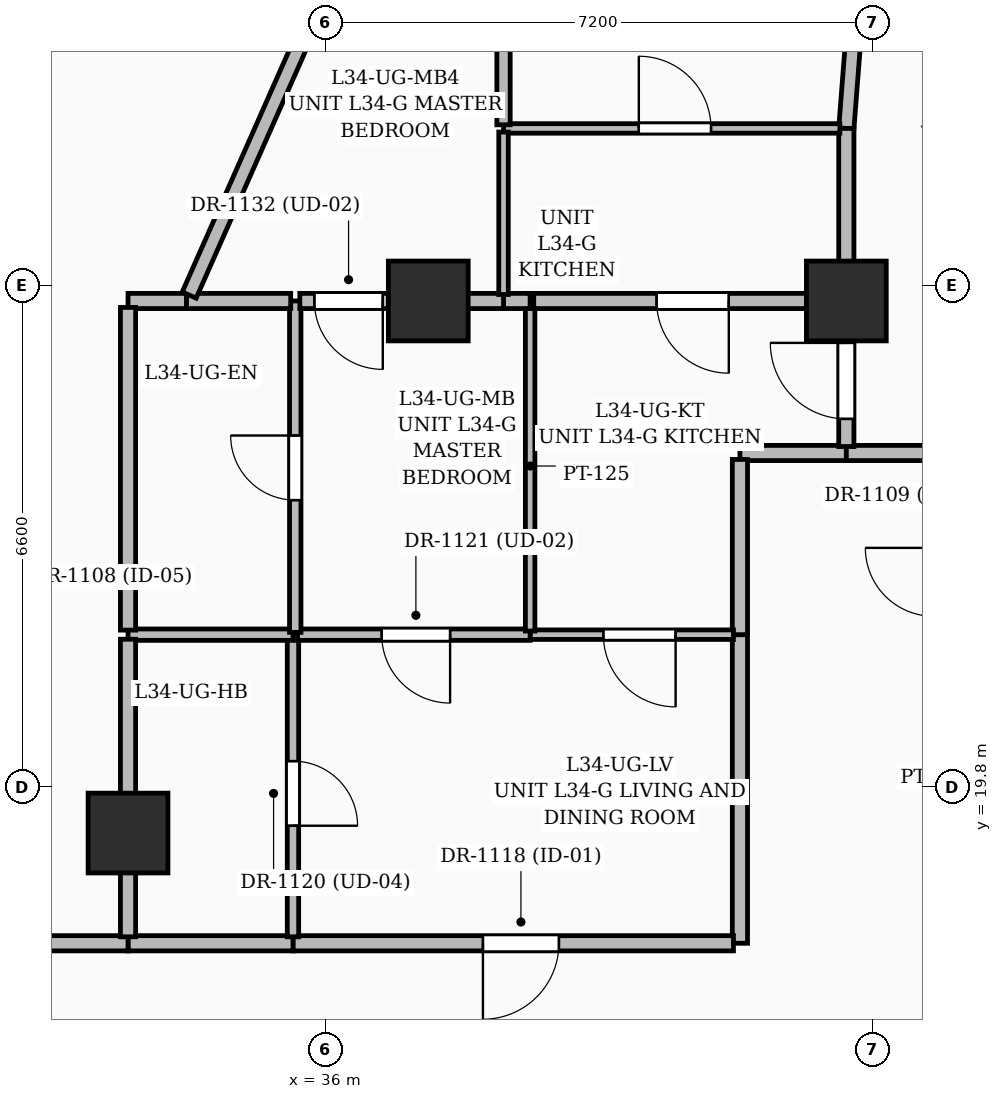
"""IFC4 building model, lengths in metres.
Left out: names, types, materials, properties, quantities, classifications, styles, units other than length and angle.
Written with IfcOpenShell. Run it as: python <this file> out.ifc"""

import sys

from ifc_helpers import new_model, si_unit, direction, frame, frame_2d, origin, origin_2d, place, context, subcontext, project, spatial, rectangle, extrude, element, fill, save


model = new_model("IFC4")
c1 = context("Model", 3, precision=1e-05, world=origin(), true_north=direction((0.0, 1.0)))
c2 = subcontext(c1, "Body", "Model", "MODEL_VIEW")
j1 = project(units=[si_unit("LENGTHUNIT", "METRE"), si_unit("PLANEANGLEUNIT", "RADIAN")], contexts=[c1])
p1 = place(None, origin())
s1 = spatial("IfcSite", under=j1, at=p1, CompositionType="ELEMENT")
p2 = place(p1, origin())
s2 = spatial("IfcBuilding", under=s1, at=p2, CompositionType="ELEMENT")
p3 = place(p2, frame((0.0, 0.0, 135.6)))
s3 = spatial("IfcBuildingStorey", under=s2, at=p3, CompositionType="ELEMENT", Elevation=135.6)
for number, where, z_axis, x_axis in (
    (1, (42.85, 26.2, 0.0), (0.0, 0.0, 1.0), (1.0, 0.0, 0.0)),
    (2, (37.35, 26.2, 0.0), (0.0, 0.0, 1.0), (1.0, 0.0, 0.0)),
    (3, (33.4, 19.2, 0.0), (0.0, 0.0, 1.0), (1.0, 0.0, 0.0)),
):
    element("IfcColumn", number, at=place(p3, frame(where, z_axis=z_axis, x_axis=x_axis)), inside=s3, PredefinedType="COLUMN", context=c2, shape_type="SweptSolid", body=[
        extrude(rectangle(XDim=1.05, YDim=1.05, at=origin_2d()), origin(), (0.0, 0.0, 1.0), 3.6),
    ])
p4 = place(p3, frame((41.45, 21.81, 0.0), z_axis=(0.0, 0.0, 1.0), x_axis=(0.0, -1.0, 0.0)))
e4 = element("IfcWall", 4, at=p4, inside=s3, PredefinedType="PARTITIONING", context=c2, shape_type="SweptSolid", body=[
    extrude(rectangle(XDim=4.06, YDim=0.2, at=frame_2d((2.03, 0.0))), origin(), (0.0, 0.0, 1.0), 3.35),
])
p5 = place(p3, frame((41.365, 17.75, 0.0), z_axis=(0.0, 0.0, 1.0), x_axis=(-1.0, 0.0, 0.0)))
e5 = element("IfcWall", 5, at=p5, inside=s3, PredefinedType="PARTITIONING", context=c2, shape_type="SweptSolid", body=[
    extrude(rectangle(XDim=5.795, YDim=0.2, at=frame_2d((2.897, 0.0))), origin(), (0.0, 0.0, 1.0), 3.35),
])
p6 = place(p5, frame((2.296, 0.0, 0.0)))
e6 = element("IfcOpeningElement", 6, at=p6, cuts=e5, PredefinedType="OPENING", context=c2, shape_type="SweptSolid", body=[
    extrude(rectangle(XDim=1.0, YDim=2.2, at=frame_2d((0.5, 1.1))), frame((0.0, 0.11, 0.0), z_axis=(0.0, -1.0, 0.0), x_axis=(1.0, 0.0, 0.0)), (0.0, 0.0, 1.0), 0.22),
])
p7 = place(p3, frame((35.57, 17.75, 0.0), z_axis=(0.0, 0.0, 1.0), x_axis=(-1.0, 0.0, 0.0)))
e7 = element("IfcWall", 7, at=p7, inside=s3, PredefinedType="PARTITIONING", context=c2, shape_type="SweptSolid", body=[
    extrude(rectangle(XDim=2.17, YDim=0.2, at=frame_2d((1.085, 0.0))), origin(), (0.0, 0.0, 1.0), 2.436),
])
p8 = place(p3, frame((42.85, 24.2, 0.0), z_axis=(0.0, 0.0, 1.0), x_axis=(-1.0, 0.0, 0.0)))
e8 = element("IfcWall", 8, at=p8, inside=s3, PredefinedType="PARTITIONING", context=c2, shape_type="SweptSolid", body=[
    extrude(rectangle(XDim=1.4, YDim=0.2, at=frame_2d((0.7, 0.0))), origin(), (0.0, 0.0, 1.0), 3.35),
])
p9 = place(p3, frame((41.45, 24.115, 0.0), z_axis=(0.0, 0.0, 1.0), x_axis=(0.0, -1.0, 0.0)))
e9 = element("IfcWall", 9, at=p9, inside=s3, PredefinedType="PARTITIONING", context=c2, shape_type="SweptSolid", body=[
    extrude(rectangle(XDim=2.305, YDim=0.2, at=frame_2d((1.152, 0.0))), origin(), (0.0, 0.0, 1.0), 3.35),
])
p10 = place(p3, frame((43.975, 24.2, 0.0), z_axis=(0.0, 0.0, 1.0), x_axis=(-1.0, 0.0, 0.0)))
e10 = element("IfcWall", 10, at=p10, inside=s3, PredefinedType="PARTITIONING", context=c2, shape_type="SweptSolid", body=[
    extrude(rectangle(XDim=1.125, YDim=0.2, at=frame_2d((0.562, 0.0))), origin(), (0.0, 0.0, 1.0), 2.436),
])
p11 = place(p3, frame((33.4, 17.75, 0.0), z_axis=(0.0, 0.0, 1.0), x_axis=(-1.0, 0.0, 0.0)))
e11 = element("IfcWall", 11, at=p11, inside=s3, PredefinedType="PARTITIONING", context=c2, shape_type="SweptSolid", body=[
    extrude(rectangle(XDim=1.45, YDim=0.2, at=frame_2d((0.725, 0.0))), origin(), (0.0, 0.0, 1.0), 3.35),
])
p12 = place(p3, frame((35.57, 21.81, 0.0), z_axis=(0.0, 0.0, 1.0), x_axis=(0.0, -1.0, 0.0)))
e12 = element("IfcWall", 12, at=p12, inside=s3, PredefinedType="PARTITIONING", context=c2, shape_type="SweptSolid", body=[
    extrude(rectangle(XDim=3.975, YDim=0.15, at=frame_2d((1.988, 0.0))), origin(), (0.0, 0.0, 1.0), 3.35),
])
p13 = place(p12, frame((1.664, 0.0, 0.0)))
e13 = element("IfcOpeningElement", 13, at=p13, cuts=e12, PredefinedType="OPENING", context=c2, shape_type="SweptSolid", body=[
    extrude(rectangle(XDim=0.85, YDim=2.1, at=frame_2d((0.425, 1.05))), frame((0.0, 0.085, 0.0), z_axis=(0.0, -1.0, 0.0), x_axis=(1.0, 0.0, 0.0)), (0.0, 0.0, 1.0), 0.17),
])
p14 = place(p3, frame((41.365, 21.81, 0.0), z_axis=(0.0, 0.0, 1.0), x_axis=(-1.0, 0.0, 0.0)))
e14 = element("IfcWall", 14, at=p14, inside=s3, PredefinedType="PARTITIONING", context=c2, shape_type="SweptSolid", body=[
    extrude(rectangle(XDim=2.675, YDim=0.125, at=frame_2d((1.337, 0.0))), origin(), (0.0, 0.0, 1.0), 3.35),
])
p15 = place(p14, frame((0.761, 0.0, 0.0)))
e15 = element("IfcOpeningElement", 15, at=p15, cuts=e14, PredefinedType="OPENING", context=c2, shape_type="SweptSolid", body=[
    extrude(rectangle(XDim=0.95, YDim=2.2, at=frame_2d((0.475, 1.1))), frame((0.0, 0.072, 0.0), z_axis=(0.0, -1.0, 0.0), x_axis=(1.0, 0.0, 0.0)), (0.0, 0.0, 1.0), 0.145),
])
p16 = place(p3, frame((38.69, 21.81, 0.0), z_axis=(0.0, 0.0, 1.0), x_axis=(-1.0, 0.0, 0.0)))
e16 = element("IfcWall", 16, at=p16, inside=s3, PredefinedType="PARTITIONING", context=c2, shape_type="SweptSolid", body=[
    extrude(rectangle(XDim=3.06, YDim=0.15, at=frame_2d((1.53, 0.0))), origin(), (0.0, 0.0, 1.0), 3.35),
])
p17 = place(p16, frame((1.053, 0.0, 0.0)))
e17 = element("IfcOpeningElement", 17, at=p17, cuts=e16, PredefinedType="OPENING", context=c2, shape_type="SweptSolid", body=[
    extrude(rectangle(XDim=0.9, YDim=2.15, at=frame_2d((0.45, 1.075))), frame((0.0, 0.085, 0.0), z_axis=(0.0, -1.0, 0.0), x_axis=(1.0, 0.0, 0.0)), (0.0, 0.0, 1.0), 0.17),
])
p18 = place(p3, frame((35.57, 21.81, 0.0), z_axis=(0.0, 0.0, 1.0), x_axis=(-1.0, 0.0, 0.0)))
e18 = element("IfcWall", 18, at=p18, inside=s3, PredefinedType="PARTITIONING", context=c2, shape_type="SweptSolid", body=[
    extrude(rectangle(XDim=2.17, YDim=0.15, at=frame_2d((1.085, 0.0))), origin(), (0.0, 0.0, 1.0), 2.436),
])
p19 = place(p3, frame((33.4, 21.75, 0.0), z_axis=(0.0, 0.0, 1.0), x_axis=(0.0, -1.0, 0.0)))
e19 = element("IfcWall", 19, at=p19, inside=s3, PredefinedType="PARTITIONING", context=c2, shape_type="SweptSolid", body=[
    extrude(rectangle(XDim=3.915, YDim=0.2, at=frame_2d((1.958, 0.0))), origin(), (0.0, 0.0, 1.0), 2.436),
])
p20 = place(p3, frame((38.69, 26.2, 0.0), z_axis=(0.0, 0.0, 1.0), x_axis=(0.0, -1.0, 0.0)))
e20 = element("IfcWall", 20, at=p20, inside=s3, PredefinedType="PARTITIONING", context=c2, shape_type="SweptSolid", body=[
    extrude(rectangle(XDim=4.343, YDim=0.125, at=frame_2d((2.171, 0.0))), origin(), (0.0, 0.0, 1.0), 2.436),
])
p21 = place(p3, frame((42.85, 24.285, 0.0), z_axis=(0.0, 0.0, 1.0), x_axis=(0.0, 1.0, 0.0)))
e21 = element("IfcWall", 21, at=p21, inside=s3, PredefinedType="PARTITIONING", context=c2, shape_type="SweptSolid", body=[
    extrude(rectangle(XDim=1.915, YDim=0.2, at=frame_2d((0.958, 0.0))), origin(), (0.0, 0.0, 1.0), 2.436),
])
p22 = place(p21, frame((0.364, 0.0, 0.0)))
e22 = element("IfcOpeningElement", 22, at=p22, cuts=e21, PredefinedType="OPENING", context=c2, shape_type="SweptSolid", body=[
    extrude(rectangle(XDim=1.0, YDim=2.2, at=frame_2d((0.5, 1.1))), frame((0.0, 0.11, 0.0), z_axis=(0.0, -1.0, 0.0), x_axis=(1.0, 0.0, 0.0)), (0.0, 0.0, 1.0), 0.22),
])
p23 = place(p3, frame((42.765, 26.2, 0.0), z_axis=(0.0, 0.0, 1.0), x_axis=(-1.0, 0.0, 0.0)))
e23 = element("IfcWall", 23, at=p23, inside=s3, PredefinedType="PARTITIONING", context=c2, shape_type="SweptSolid", body=[
    extrude(rectangle(XDim=4.027, YDim=0.2, at=frame_2d((2.014, 0.0))), origin(), (0.0, 0.0, 1.0), 2.436),
])
p24 = place(p23, frame((1.461, 0.0, 0.0)))
e24 = element("IfcOpeningElement", 24, at=p24, cuts=e23, PredefinedType="OPENING", context=c2, shape_type="SweptSolid", body=[
    extrude(rectangle(XDim=0.95, YDim=2.2, at=frame_2d((0.475, 1.1))), frame((0.0, 0.11, 0.0), z_axis=(0.0, -1.0, 0.0), x_axis=(1.0, 0.0, 0.0)), (0.0, 0.0, 1.0), 0.22),
])
p25 = place(p3, frame((35.6, 21.84, 0.0), z_axis=(0.0, 0.0, 1.0), x_axis=(0.0, 1.0, 0.0)))
e25 = element("IfcWall", 25, at=p25, inside=s3, PredefinedType="PARTITIONING", context=c2, shape_type="SweptSolid", body=[
    extrude(rectangle(XDim=4.36, YDim=0.15, at=frame_2d((2.18, 0.0))), origin(), (0.0, 0.0, 1.0), 2.436),
])
p26 = place(p25, frame((1.74, 0.0, 0.0)))
e26 = element("IfcOpeningElement", 26, at=p26, cuts=e25, PredefinedType="OPENING", context=c2, shape_type="SweptSolid", body=[
    extrude(rectangle(XDim=0.85, YDim=2.1, at=frame_2d((0.425, 1.05))), frame((0.0, 0.085, 0.0), z_axis=(0.0, -1.0, 0.0), x_axis=(1.0, 0.0, 0.0)), (0.0, 0.0, 1.0), 0.17),
])
p27 = place(p3, frame((38.69, 26.2, 0.0), z_axis=(0.0, 0.0, 1.0), x_axis=(-1.0, 0.0, 0.0)))
e27 = element("IfcWall", 27, at=p27, inside=s3, PredefinedType="PARTITIONING", context=c2, shape_type="SweptSolid", body=[
    extrude(rectangle(XDim=0.35, YDim=0.2, at=frame_2d((0.175, 0.0))), origin(), (0.0, 0.0, 1.0), 2.436),
])
p28 = place(p3, frame((38.34, 26.2, 0.0), z_axis=(0.0, 0.0, 1.0), x_axis=(-1.0, 0.0, 0.0)))
e28 = element("IfcWall", 28, at=p28, inside=s3, PredefinedType="PARTITIONING", context=c2, shape_type="SweptSolid", body=[
    extrude(rectangle(XDim=2.68, YDim=0.2, at=frame_2d((1.34, 0.0))), origin(), (0.0, 0.0, 1.0), 2.436),
])
p29 = place(p28, frame((1.589, 0.0, 0.0)))
e29 = element("IfcOpeningElement", 29, at=p29, cuts=e28, PredefinedType="OPENING", context=c2, shape_type="SweptSolid", body=[
    extrude(rectangle(XDim=0.9, YDim=2.15, at=frame_2d((0.45, 1.075))), frame((0.0, 0.11, 0.0), z_axis=(0.0, -1.0, 0.0), x_axis=(1.0, 0.0, 0.0)), (0.0, 0.0, 1.0), 0.22),
])
p30 = place(p3, frame((34.17, 26.2, 0.0), z_axis=(0.0, 0.0, 1.0), x_axis=(-1.0, 0.0, 0.0)))
e30 = element("IfcWall", 30, at=p30, inside=s3, PredefinedType="PARTITIONING", context=c2, shape_type="SweptSolid", body=[
    extrude(rectangle(XDim=0.77, YDim=0.2, at=frame_2d((0.385, 0.0))), origin(), (0.0, 0.0, 1.0), 3.35),
])
p31 = place(p3, frame((33.4, 26.115, 0.0), z_axis=(0.0, 0.0, 1.0), x_axis=(0.0, -1.0, 0.0)))
e31 = element("IfcWall", 31, at=p31, inside=s3, PredefinedType="PARTITIONING", context=c2, shape_type="SweptSolid", body=[
    extrude(rectangle(XDim=4.245, YDim=0.2, at=frame_2d((2.123, 0.0))), origin(), (0.0, 0.0, 1.0), 2.709),
])
p32 = place(p3, frame((35.54, 26.2, 0.0), z_axis=(0.0, 0.0, 1.0), x_axis=(-1.0, 0.0, 0.0)))
e32 = element("IfcWall", 32, at=p32, inside=s3, PredefinedType="PARTITIONING", context=c2, shape_type="SweptSolid", body=[
    extrude(rectangle(XDim=1.37, YDim=0.2, at=frame_2d((0.685, 0.0))), origin(), (0.0, 0.0, 1.0), 2.709),
])
p33 = place(p3, frame((43.276, 33.964, 0.0), z_axis=(0.0, 0.0, 1.0), x_axis=(-0.077265658671, -0.997010540561, 0.0)))
e33 = element("IfcWall", 33, at=p33, inside=s3, PredefinedType="PARTITIONING", context=c2, shape_type="SweptSolid", body=[
    extrude(rectangle(XDim=5.51, YDim=0.2, at=frame_2d((2.755, 0.0))), origin(), (0.0, 0.0, 1.0), 2.372),
])
p34 = place(p33, frame((2.116, 0.0, 0.0)))
e34 = element("IfcOpeningElement", 34, at=p34, cuts=e33, PredefinedType="OPENING", context=c2, shape_type="SweptSolid", body=[
    extrude(rectangle(XDim=1.0, YDim=2.2, at=frame_2d((0.5, 1.1))), frame((0.0, 0.11, 0.0), z_axis=(0.0, -1.0, 0.0), x_axis=(1.0, 0.0, 0.0)), (0.0, 0.0, 1.0), 0.22),
])
p35 = place(p3, frame((42.85, 28.47, 0.0), z_axis=(0.0, 0.0, 1.0), x_axis=(0.0, -1.0, 0.0)))
e35 = element("IfcWall", 35, at=p35, inside=s3, PredefinedType="PARTITIONING", context=c2, shape_type="SweptSolid", body=[
    extrude(rectangle(XDim=2.27, YDim=0.2, at=frame_2d((1.135, 0.0))), origin(), (0.0, 0.0, 1.0), 2.372),
])
p36 = place(p3, frame((34.204, 26.278, 0.0), z_axis=(0.0, 0.0, 1.0), x_axis=(0.404777402146, 0.914415252887, 0.0)))
e36 = element("IfcWall", 36, at=p36, inside=s3, PredefinedType="PARTITIONING", context=c2, shape_type="SweptSolid", body=[
    extrude(rectangle(XDim=9.723, YDim=0.2, at=frame_2d((4.861, 0.0))), origin(), (0.0, 0.0, 1.0), 2.372),
])
p37 = place(p3, frame((38.34, 28.47, 0.0), z_axis=(0.0, 0.0, 1.0), x_axis=(1.0, 0.0, 0.0)))
e37 = element("IfcWall", 37, at=p37, inside=s3, PredefinedType="PARTITIONING", context=c2, shape_type="SweptSolid", body=[
    extrude(rectangle(XDim=4.425, YDim=0.125, at=frame_2d((2.212, 0.0))), origin(), (0.0, 0.0, 1.0), 2.372),
])
p38 = place(p37, frame((1.78, 0.0, 0.0)))
e38 = element("IfcOpeningElement", 38, at=p38, cuts=e37, PredefinedType="OPENING", context=c2, shape_type="SweptSolid", body=[
    extrude(rectangle(XDim=0.95, YDim=2.2, at=frame_2d((0.475, 1.1))), frame((0.0, 0.072, 0.0), z_axis=(0.0, -1.0, 0.0), x_axis=(1.0, 0.0, 0.0)), (0.0, 0.0, 1.0), 0.145),
])
p39 = place(p3, frame((38.34, 35.62, 0.0), z_axis=(0.0, 0.0, 1.0), x_axis=(0.0, -1.0, 0.0)))
e39 = element("IfcWall", 39, at=p39, inside=s3, PredefinedType="PARTITIONING", context=c2, shape_type="SweptSolid", body=[
    extrude(rectangle(XDim=7.103, YDim=0.175, at=frame_2d((3.551, 0.0))), origin(), (0.0, 0.0, 1.0), 2.57),
])
p40 = place(p39, frame((3.125, 0.0, 0.0)))
e40 = element("IfcOpeningElement", 40, at=p40, cuts=e39, PredefinedType="OPENING", context=c2, shape_type="SweptSolid", body=[
    extrude(rectangle(XDim=0.9, YDim=2.15, at=frame_2d((0.45, 1.075))), frame((0.0, 0.097, 0.0), z_axis=(0.0, -1.0, 0.0), x_axis=(1.0, 0.0, 0.0)), (0.0, 0.0, 1.0), 0.195),
])
p41 = place(p3, frame((38.34, 28.423, 0.0), z_axis=(0.0, 0.0, 1.0), x_axis=(0.0, -1.0, 0.0)))
e41 = element("IfcWall", 41, at=p41, inside=s3, PredefinedType="PARTITIONING", context=c2, shape_type="SweptSolid", body=[
    extrude(rectangle(XDim=2.138, YDim=0.125, at=frame_2d((1.069, 0.0))), origin(), (0.0, 0.0, 1.0), 2.436),
])
p42 = place(p6, origin())
e42 = element("IfcDoor", 42, at=p42, inside=s3, OperationType="SINGLE_SWING_RIGHT", PredefinedType="DOOR", context=c2, shape_type="SweptSolid", body=[
    extrude(rectangle(XDim=1.0, YDim=2.2, at=frame_2d((0.5, 1.1))), frame((0.0, 0.025, 0.0), z_axis=(0.0, -1.0, 0.0), x_axis=(1.0, 0.0, 0.0)), (0.0, 0.0, 1.0), 0.05),
])
fill(e6, e42)
p43 = place(p15, origin())
e43 = element("IfcDoor", 43, at=p43, inside=s3, OperationType="SINGLE_SWING_LEFT", PredefinedType="DOOR", context=c2, shape_type="SweptSolid", body=[
    extrude(rectangle(XDim=0.95, YDim=2.2, at=frame_2d((0.475, 1.1))), frame((0.0, 0.025, 0.0), z_axis=(0.0, -1.0, 0.0), x_axis=(1.0, 0.0, 0.0)), (0.0, 0.0, 1.0), 0.05),
])
fill(e15, e43)
p44 = place(p13, origin())
e44 = element("IfcDoor", 44, at=p44, inside=s3, OperationType="SINGLE_SWING_RIGHT", PredefinedType="DOOR", context=c2, shape_type="SweptSolid", body=[
    extrude(rectangle(XDim=0.85, YDim=2.1, at=frame_2d((0.425, 1.05))), frame((0.0, 0.025, 0.0), z_axis=(0.0, -1.0, 0.0), x_axis=(1.0, 0.0, 0.0)), (0.0, 0.0, 1.0), 0.05),
])
fill(e13, e44)
p45 = place(p17, origin())
e45 = element("IfcDoor", 45, at=p45, inside=s3, OperationType="SINGLE_SWING_LEFT", PredefinedType="DOOR", context=c2, shape_type="SweptSolid", body=[
    extrude(rectangle(XDim=0.9, YDim=2.15, at=frame_2d((0.45, 1.075))), frame((0.0, 0.025, 0.0), z_axis=(0.0, -1.0, 0.0), x_axis=(1.0, 0.0, 0.0)), (0.0, 0.0, 1.0), 0.05),
])
fill(e17, e45)
p46 = place(p26, origin())
e46 = element("IfcDoor", 46, at=p46, inside=s3, OperationType="SINGLE_SWING_RIGHT", PredefinedType="DOOR", context=c2, shape_type="SweptSolid", body=[
    extrude(rectangle(XDim=0.85, YDim=2.1, at=frame_2d((0.425, 1.05))), frame((0.0, 0.025, 0.0), z_axis=(0.0, -1.0, 0.0), x_axis=(1.0, 0.0, 0.0)), (0.0, 0.0, 1.0), 0.05),
])
fill(e26, e46)
p47 = place(p38, origin())
e47 = element("IfcDoor", 47, at=p47, inside=s3, OperationType="SINGLE_SWING_LEFT", PredefinedType="DOOR", context=c2, shape_type="SweptSolid", body=[
    extrude(rectangle(XDim=0.95, YDim=2.2, at=frame_2d((0.475, 1.1))), frame((0.0, 0.025, 0.0), z_axis=(0.0, -1.0, 0.0), x_axis=(1.0, 0.0, 0.0)), (0.0, 0.0, 1.0), 0.05),
])
fill(e38, e47)
p48 = place(p22, origin())
e48 = element("IfcDoor", 48, at=p48, inside=s3, OperationType="SINGLE_SWING_RIGHT", PredefinedType="DOOR", context=c2, shape_type="SweptSolid", body=[
    extrude(rectangle(XDim=1.0, YDim=2.2, at=frame_2d((0.5, 1.1))), frame((0.0, 0.025, 0.0), z_axis=(0.0, -1.0, 0.0), x_axis=(1.0, 0.0, 0.0)), (0.0, 0.0, 1.0), 0.05),
])
fill(e22, e48)
p49 = place(p24, origin())
e49 = element("IfcDoor", 49, at=p49, inside=s3, OperationType="SINGLE_SWING_LEFT", PredefinedType="DOOR", context=c2, shape_type="SweptSolid", body=[
    extrude(rectangle(XDim=0.95, YDim=2.2, at=frame_2d((0.475, 1.1))), frame((0.0, 0.025, 0.0), z_axis=(0.0, -1.0, 0.0), x_axis=(1.0, 0.0, 0.0)), (0.0, 0.0, 1.0), 0.05),
])
fill(e24, e49)
p50 = place(p29, origin())
e50 = element("IfcDoor", 50, at=p50, inside=s3, OperationType="SINGLE_SWING_LEFT", PredefinedType="DOOR", context=c2, shape_type="SweptSolid", body=[
    extrude(rectangle(XDim=0.9, YDim=2.15, at=frame_2d((0.45, 1.075))), frame((0.0, 0.025, 0.0), z_axis=(0.0, -1.0, 0.0), x_axis=(1.0, 0.0, 0.0)), (0.0, 0.0, 1.0), 0.05),
])
fill(e29, e50)
save(model, sys.argv[1])
